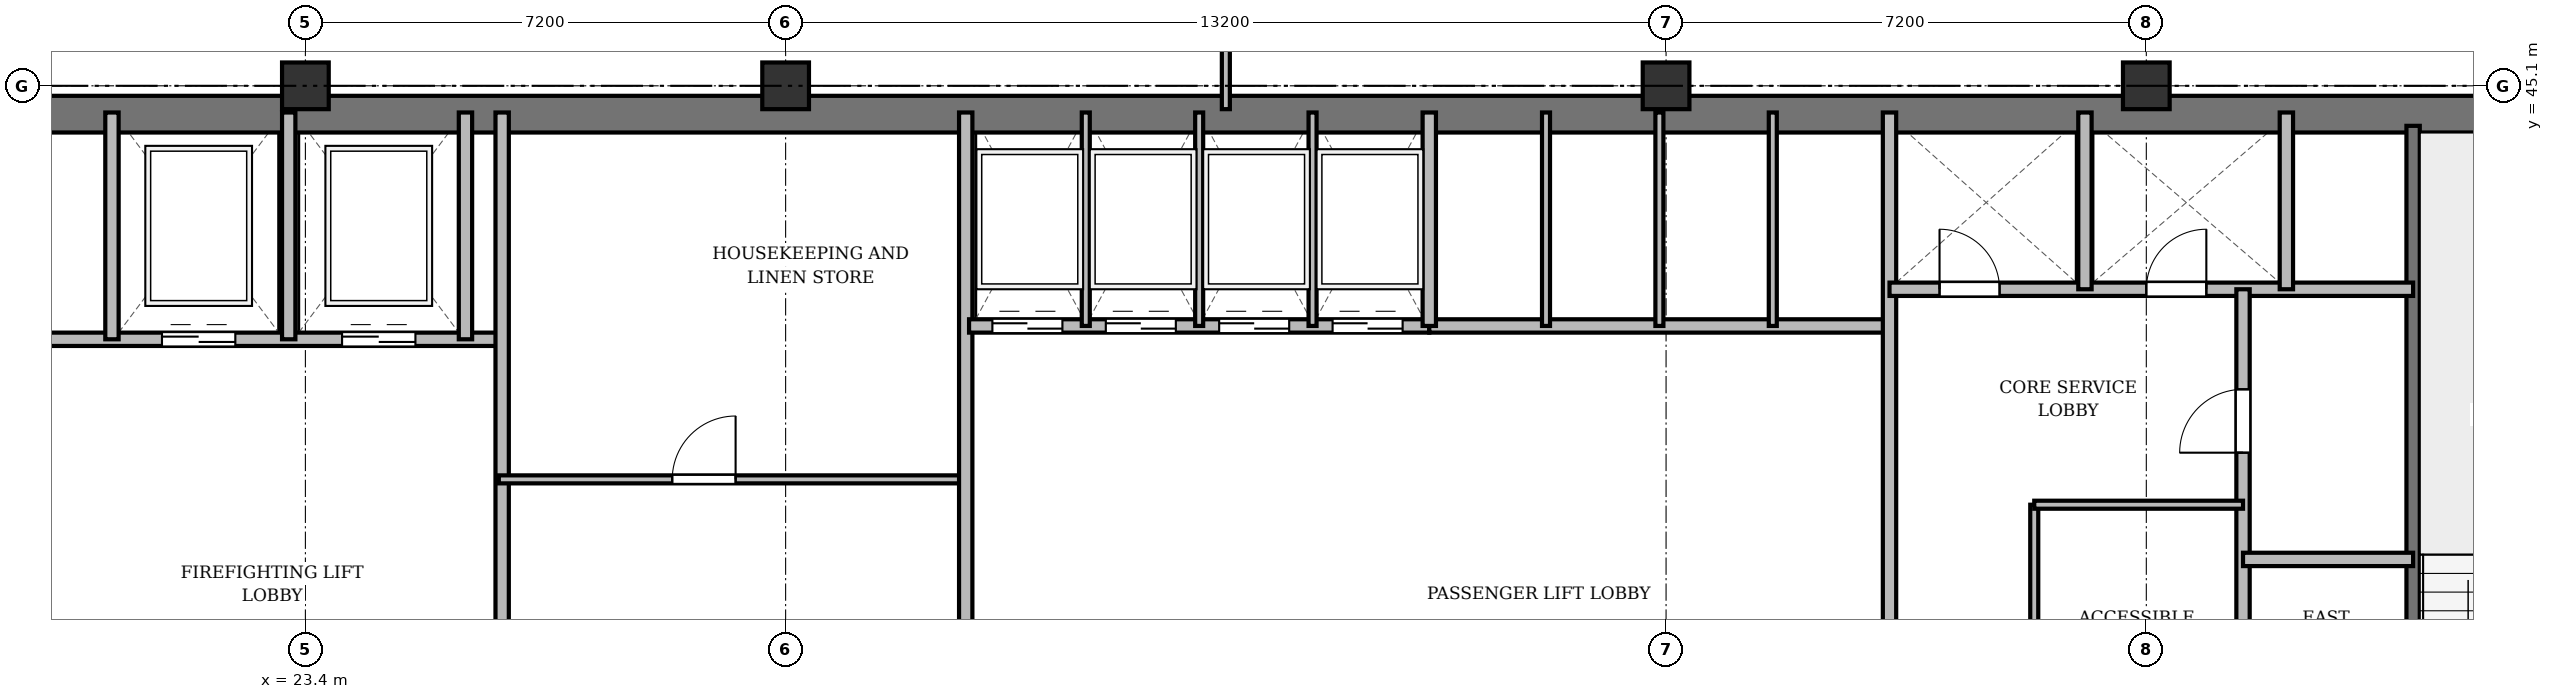
"""IFC4 building model, lengths in metres.
Left out: names, types, materials, properties, quantities, classifications, styles, units other than length and angle.
Written with IfcOpenShell. Run it as: python <this file> out.ifc"""

import sys

from ifc_helpers import new_model, si_unit, direction, frame, frame_2d, origin, origin_2d, place, context, subcontext, project, spatial, rectangle, extrude, source, transform, mapped, element, fill, save


model = new_model("IFC4")
c1 = context("Model", 3, precision=1e-05, world=origin(), true_north=direction((0.0, 1.0)))
c2 = subcontext(c1, "Body", "Model", "MODEL_VIEW")
j1 = project(units=[si_unit("LENGTHUNIT", "METRE"), si_unit("PLANEANGLEUNIT", "RADIAN")], contexts=[c1])
p1 = place(None, origin())
s1 = spatial("IfcSite", under=j1, at=p1, CompositionType="ELEMENT")
p2 = place(p1, origin())
s2 = spatial("IfcBuilding", under=s1, at=p2, CompositionType="ELEMENT")
p3 = place(p2, frame((0.0, 0.0, 212.1)))
s3 = spatial("IfcBuildingStorey", under=s2, at=p3, CompositionType="ELEMENT", Elevation=212.1)
m1 = source(origin(), c2, "Body", "SweptSolid", [
    extrude(rectangle(XDim=0.7, YDim=0.7, at=origin_2d()), origin(), (0.0, 0.0, 1.0), 3.6),
])
for number, where, z_axis, x_axis in (
    (1, (23.4, 45.1, 0.0), (0.0, 0.0, 1.0), (1.0, 0.0, 0.0)),
    (2, (30.6, 45.1, 0.0), (0.0, 0.0, 1.0), (1.0, 0.0, 0.0)),
    (3, (43.8, 45.1, 0.0), (0.0, 0.0, 1.0), (1.0, 0.0, 0.0)),
    (4, (51.0, 45.1, 0.0), (0.0, 0.0, 1.0), (1.0, 0.0, 0.0)),
):
    element("IfcColumn", number, at=place(p3, frame(where, z_axis=z_axis, x_axis=x_axis)), inside=s3, PredefinedType="COLUMN", context=c2, shape_type="MappedRepresentation", body=[
        mapped(m1, transform((0.0, 0.0, 0.0), x_axis=(1.0, 0.0, 0.0), y_axis=(0.0, 1.0, 0.0), z_axis=(0.0, 0.0, 1.0), scale=1.0)),
    ])
p4 = place(p3, frame((15.65, 44.675, 0.0), z_axis=(0.0, 0.0, 1.0), x_axis=(1.0, 0.0, 0.0)))
e5 = element("IfcWall", 5, at=p4, inside=s3, PredefinedType="SHEAR", context=c2, shape_type="SweptSolid", body=[
    extrude(rectangle(XDim=43.1, YDim=0.55, at=frame_2d((21.55, 0.0))), origin(), (0.0, 0.0, 1.0), 3.36),
])
p5 = place(p3, frame((55.0, 33.4, 0.0), z_axis=(0.0, 0.0, 1.0), x_axis=(0.0, 1.0, 0.0)))
e6 = element("IfcWall", 6, at=p5, inside=s3, PredefinedType="SHEAR", context=c2, shape_type="SweptSolid", body=[
    extrude(rectangle(XDim=11.1, YDim=0.2, at=frame_2d((5.55, 0.0))), origin(), (0.0, 0.0, 1.0), 3.36),
])
p6 = place(p5, frame((0.85, 0.0, 0.0)))
e7 = element("IfcOpeningElement", 7, at=p6, cuts=e6, PredefinedType="OPENING", context=c2, shape_type="SweptSolid", body=[
    extrude(rectangle(XDim=1.1, YDim=2.15, at=frame_2d((0.55, 1.075))), frame((0.0, 0.11, 0.0), z_axis=(0.0, -1.0, 0.0), x_axis=(1.0, 0.0, 0.0)), (0.0, 0.0, 1.0), 0.22),
])
p7 = place(p3, frame((19.55, 41.3, 0.0), z_axis=(0.0, 0.0, 1.0), x_axis=(1.0, 0.0, 0.0)))
e8 = element("IfcWall", 8, at=p7, inside=s3, PredefinedType="SOLIDWALL", context=c2, shape_type="SweptSolid", body=[
    extrude(rectangle(XDim=6.75, YDim=0.2, at=frame_2d((3.375, 0.0))), origin(), (0.0, 0.0, 1.0), 3.36),
])
p8 = place(p7, frame((1.7, 0.0, 0.0)))
e9 = element("IfcOpeningElement", 9, at=p8, cuts=e8, PredefinedType="OPENING", context=c2, shape_type="SweptSolid", body=[
    extrude(rectangle(XDim=1.1, YDim=2.15, at=frame_2d((0.55, 1.075))), frame((0.0, 0.11, 0.0), z_axis=(0.0, -1.0, 0.0), x_axis=(1.0, 0.0, 0.0)), (0.0, 0.0, 1.0), 0.22),
])
p9 = place(p7, frame((4.4, 0.0, 0.0)))
e10 = element("IfcOpeningElement", 10, at=p9, cuts=e8, PredefinedType="OPENING", context=c2, shape_type="SweptSolid", body=[
    extrude(rectangle(XDim=1.1, YDim=2.15, at=frame_2d((0.55, 1.075))), frame((0.0, 0.11, 0.0), z_axis=(0.0, -1.0, 0.0), x_axis=(1.0, 0.0, 0.0)), (0.0, 0.0, 1.0), 0.22),
])
for number, where, z_axis, x_axis in (
    (11, (20.5, 41.3, 0.0), (0.0, 0.0, 1.0), (0.0, 1.0, 0.0)),
    (12, (23.15, 41.3, 0.0), (0.0, 0.0, 1.0), (0.0, 1.0, 0.0)),
    (13, (25.8, 41.3, 0.0), (0.0, 0.0, 1.0), (0.0, 1.0, 0.0)),
):
    element("IfcWall", number, at=place(p3, frame(where, z_axis=z_axis, x_axis=x_axis)), inside=s3, PredefinedType="SOLIDWALL", context=c2, shape_type="SweptSolid", body=[
        extrude(rectangle(XDim=3.4, YDim=0.2, at=frame_2d((1.7, 0.0))), origin(), (0.0, 0.0, 1.0), 3.36),
    ])
p10 = place(p3, frame((26.35, 33.4, 0.0), z_axis=(0.0, 0.0, 1.0), x_axis=(0.0, 1.0, 0.0)))
e14 = element("IfcWall", 14, at=p10, inside=s3, PredefinedType="SOLIDWALL", context=c2, shape_type="SweptSolid", body=[
    extrude(rectangle(XDim=11.3, YDim=0.2, at=frame_2d((5.65, 0.0))), origin(), (0.0, 0.0, 1.0), 2.91),
])
p11 = place(p3, frame((26.3, 39.2, 0.0), z_axis=(0.0, 0.0, 1.0), x_axis=(1.0, 0.0, 0.0)))
e15 = element("IfcWall", 15, at=p11, inside=s3, PredefinedType="PARTITIONING", context=c2, shape_type="SweptSolid", body=[
    extrude(rectangle(XDim=7.0, YDim=0.12, at=frame_2d((3.5, 0.0))), origin(), (0.0, 0.0, 1.0), 2.86),
])
p12 = place(p11, frame((2.6, 0.0, 0.0)))
e16 = element("IfcOpeningElement", 16, at=p12, cuts=e15, PredefinedType="OPENING", context=c2, shape_type="SweptSolid", body=[
    extrude(rectangle(XDim=0.95, YDim=2.15, at=frame_2d((0.475, 1.075))), frame((0.0, 0.07, 0.0), z_axis=(0.0, -1.0, 0.0), x_axis=(1.0, 0.0, 0.0)), (0.0, 0.0, 1.0), 0.14),
])
p13 = place(p3, frame((33.3, 33.4, 0.0), z_axis=(0.0, 0.0, 1.0), x_axis=(0.0, 1.0, 0.0)))
e17 = element("IfcWall", 17, at=p13, inside=s3, PredefinedType="SOLIDWALL", context=c2, shape_type="SweptSolid", body=[
    extrude(rectangle(XDim=11.3, YDim=0.2, at=frame_2d((5.65, 0.0))), origin(), (0.0, 0.0, 1.0), 2.91),
])
p14 = place(p3, frame((33.35, 41.5, 0.0), z_axis=(0.0, 0.0, 1.0), x_axis=(1.0, 0.0, 0.0)))
e18 = element("IfcWall", 18, at=p14, inside=s3, PredefinedType="SOLIDWALL", context=c2, shape_type="SweptSolid", body=[
    extrude(rectangle(XDim=6.9, YDim=0.2, at=frame_2d((3.45, 0.0))), origin(), (0.0, 0.0, 1.0), 3.36),
])
p15 = place(p14, frame((0.35, 0.0, 0.0)))
e19 = element("IfcOpeningElement", 19, at=p15, cuts=e18, PredefinedType="OPENING", context=c2, shape_type="SweptSolid", body=[
    extrude(rectangle(XDim=1.05, YDim=2.15, at=frame_2d((0.525, 1.075))), frame((0.0, 0.11, 0.0), z_axis=(0.0, -1.0, 0.0), x_axis=(1.0, 0.0, 0.0)), (0.0, 0.0, 1.0), 0.22),
])
p16 = place(p14, frame((2.05, 0.0, 0.0)))
e20 = element("IfcOpeningElement", 20, at=p16, cuts=e18, PredefinedType="OPENING", context=c2, shape_type="SweptSolid", body=[
    extrude(rectangle(XDim=1.05, YDim=2.15, at=frame_2d((0.525, 1.075))), frame((0.0, 0.11, 0.0), z_axis=(0.0, -1.0, 0.0), x_axis=(1.0, 0.0, 0.0)), (0.0, 0.0, 1.0), 0.22),
])
p17 = place(p14, frame((3.75, 0.0, 0.0)))
e21 = element("IfcOpeningElement", 21, at=p17, cuts=e18, PredefinedType="OPENING", context=c2, shape_type="SweptSolid", body=[
    extrude(rectangle(XDim=1.05, YDim=2.15, at=frame_2d((0.525, 1.075))), frame((0.0, 0.11, 0.0), z_axis=(0.0, -1.0, 0.0), x_axis=(1.0, 0.0, 0.0)), (0.0, 0.0, 1.0), 0.22),
])
p18 = place(p14, frame((5.45, 0.0, 0.0)))
e22 = element("IfcOpeningElement", 22, at=p18, cuts=e18, PredefinedType="OPENING", context=c2, shape_type="SweptSolid", body=[
    extrude(rectangle(XDim=1.05, YDim=2.15, at=frame_2d((0.525, 1.075))), frame((0.0, 0.11, 0.0), z_axis=(0.0, -1.0, 0.0), x_axis=(1.0, 0.0, 0.0)), (0.0, 0.0, 1.0), 0.22),
])
for number, where, z_axis, x_axis in (
    (23, (35.1, 41.5, 0.0), (0.0, 0.0, 1.0), (0.0, 1.0, 0.0)),
    (24, (36.8, 41.5, 0.0), (0.0, 0.0, 1.0), (0.0, 1.0, 0.0)),
    (25, (38.5, 41.5, 0.0), (0.0, 0.0, 1.0), (0.0, 1.0, 0.0)),
):
    element("IfcWall", number, at=place(p3, frame(where, z_axis=z_axis, x_axis=x_axis)), inside=s3, PredefinedType="PARTITIONING", context=c2, shape_type="SweptSolid", body=[
        extrude(rectangle(XDim=3.2, YDim=0.12, at=frame_2d((1.6, 0.0))), origin(), (0.0, 0.0, 1.0), 3.36),
    ])
p19 = place(p3, frame((40.25, 41.5, 0.0), z_axis=(0.0, 0.0, 1.0), x_axis=(1.0, 0.0, 0.0)))
e26 = element("IfcWall", 26, at=p19, inside=s3, PredefinedType="SOLIDWALL", context=c2, shape_type="SweptSolid", body=[
    extrude(rectangle(XDim=6.9, YDim=0.2, at=frame_2d((3.45, 0.0))), origin(), (0.0, 0.0, 1.0), 3.36),
])
p20 = place(p3, frame((40.25, 41.5, 0.0), z_axis=(0.0, 0.0, 1.0), x_axis=(0.0, 1.0, 0.0)))
e27 = element("IfcWall", 27, at=p20, inside=s3, PredefinedType="SOLIDWALL", context=c2, shape_type="SweptSolid", body=[
    extrude(rectangle(XDim=3.2, YDim=0.2, at=frame_2d((1.6, 0.0))), origin(), (0.0, 0.0, 1.0), 3.36),
])
for number, where, z_axis, x_axis in (
    (28, (42.0, 41.5, 0.0), (0.0, 0.0, 1.0), (0.0, 1.0, 0.0)),
    (29, (43.7, 41.5, 0.0), (0.0, 0.0, 1.0), (0.0, 1.0, 0.0)),
    (30, (45.4, 41.5, 0.0), (0.0, 0.0, 1.0), (0.0, 1.0, 0.0)),
):
    element("IfcWall", number, at=place(p3, frame(where, z_axis=z_axis, x_axis=x_axis)), inside=s3, PredefinedType="PARTITIONING", context=c2, shape_type="SweptSolid", body=[
        extrude(rectangle(XDim=3.2, YDim=0.12, at=frame_2d((1.6, 0.0))), origin(), (0.0, 0.0, 1.0), 3.36),
    ])
p21 = place(p3, frame((47.15, 33.4, 0.0), z_axis=(0.0, 0.0, 1.0), x_axis=(0.0, 1.0, 0.0)))
e31 = element("IfcWall", 31, at=p21, inside=s3, PredefinedType="SOLIDWALL", context=c2, shape_type="SweptSolid", body=[
    extrude(rectangle(XDim=11.3, YDim=0.2, at=frame_2d((5.65, 0.0))), origin(), (0.0, 0.0, 1.0), 2.91),
])
p22 = place(p3, frame((47.15, 42.05, 0.0), z_axis=(0.0, 0.0, 1.0), x_axis=(1.0, 0.0, 0.0)))
e32 = element("IfcWall", 32, at=p22, inside=s3, PredefinedType="SOLIDWALL", context=c2, shape_type="SweptSolid", body=[
    extrude(rectangle(XDim=7.85, YDim=0.2, at=frame_2d((3.925, 0.0))), origin(), (0.0, 0.0, 1.0), 2.86),
])
p23 = place(p22, frame((0.75, 0.0, 0.0)))
e33 = element("IfcOpeningElement", 33, at=p23, cuts=e32, PredefinedType="OPENING", context=c2, shape_type="SweptSolid", body=[
    extrude(rectangle(XDim=0.9, YDim=2.1, at=frame_2d((0.45, 1.05))), frame((0.0, 0.11, 0.0), z_axis=(0.0, -1.0, 0.0), x_axis=(1.0, 0.0, 0.0)), (0.0, 0.0, 1.0), 0.22),
])
p24 = place(p22, frame((3.85, 0.0, 0.0)))
e34 = element("IfcOpeningElement", 34, at=p24, cuts=e32, PredefinedType="OPENING", context=c2, shape_type="SweptSolid", body=[
    extrude(rectangle(XDim=0.9, YDim=2.1, at=frame_2d((0.45, 1.05))), frame((0.0, 0.11, 0.0), z_axis=(0.0, -1.0, 0.0), x_axis=(1.0, 0.0, 0.0)), (0.0, 0.0, 1.0), 0.22),
])
for number, where, z_axis, x_axis in (
    (35, (50.08, 42.05, 0.0), (0.0, 0.0, 1.0), (0.0, 1.0, 0.0)),
    (36, (53.1, 42.05, 0.0), (0.0, 0.0, 1.0), (0.0, 1.0, 0.0)),
):
    element("IfcWall", number, at=place(p3, frame(where, z_axis=z_axis, x_axis=x_axis)), inside=s3, PredefinedType="SOLIDWALL", context=c2, shape_type="SweptSolid", body=[
        extrude(rectangle(XDim=2.65, YDim=0.2, at=frame_2d((1.325, 0.0))), origin(), (0.0, 0.0, 1.0), 3.36),
    ])
p25 = place(p3, frame((52.45, 33.4, 0.0), z_axis=(0.0, 0.0, 1.0), x_axis=(0.0, 1.0, 0.0)))
e37 = element("IfcWall", 37, at=p25, inside=s3, PredefinedType="PARTITIONING", context=c2, shape_type="SweptSolid", body=[
    extrude(rectangle(XDim=8.65, YDim=0.2, at=frame_2d((4.325, 0.0))), origin(), (0.0, 0.0, 1.0), 2.91),
])
p26 = place(p25, frame((6.2, 0.0, 0.0)))
e38 = element("IfcOpeningElement", 38, at=p26, cuts=e37, PredefinedType="OPENING", context=c2, shape_type="SweptSolid", body=[
    extrude(rectangle(XDim=0.95, YDim=2.15, at=frame_2d((0.475, 1.075))), frame((0.0, 0.11, 0.0), z_axis=(0.0, -1.0, 0.0), x_axis=(1.0, 0.0, 0.0)), (0.0, 0.0, 1.0), 0.22),
])
p27 = place(p3, frame((52.45, 38.0, 0.0), z_axis=(0.0, 0.0, 1.0), x_axis=(1.0, 0.0, 0.0)))
e39 = element("IfcWall", 39, at=p27, inside=s3, PredefinedType="PARTITIONING", context=c2, shape_type="SweptSolid", body=[
    extrude(rectangle(XDim=2.55, YDim=0.2, at=frame_2d((1.275, 0.0))), origin(), (0.0, 0.0, 1.0), 3.36),
])
p28 = place(p3, frame((49.32, 33.4, 0.0), z_axis=(0.0, 0.0, 1.0), x_axis=(0.0, 1.0, 0.0)))
e40 = element("IfcWall", 40, at=p28, inside=s3, PredefinedType="PARTITIONING", context=c2, shape_type="SweptSolid", body=[
    extrude(rectangle(XDim=5.42, YDim=0.12, at=frame_2d((2.71, 0.0))), origin(), (0.0, 0.0, 1.0), 2.91),
])
p29 = place(p28, frame((1.6, 0.0, 0.0)))
e41 = element("IfcOpeningElement", 41, at=p29, cuts=e40, PredefinedType="OPENING", context=c2, shape_type="SweptSolid", body=[
    extrude(rectangle(XDim=0.95, YDim=2.15, at=frame_2d((0.475, 1.075))), frame((0.0, 0.07, 0.0), z_axis=(0.0, -1.0, 0.0), x_axis=(1.0, 0.0, 0.0)), (0.0, 0.0, 1.0), 0.14),
])
p30 = place(p3, frame((49.32, 38.82, 0.0), z_axis=(0.0, 0.0, 1.0), x_axis=(1.0, 0.0, 0.0)))
e42 = element("IfcWall", 42, at=p30, inside=s3, PredefinedType="PARTITIONING", context=c2, shape_type="SweptSolid", body=[
    extrude(rectangle(XDim=3.13, YDim=0.12, at=frame_2d((1.565, 0.0))), origin(), (0.0, 0.0, 1.0), 2.86),
])
p31 = place(p3, frame((37.2, 44.75, 0.0), z_axis=(0.0, 0.0, 1.0), x_axis=(0.0, 1.0, 0.0)))
e43 = element("IfcWall", 43, at=p31, inside=s3, PredefinedType="PARTITIONING", context=c2, shape_type="SweptSolid", body=[
    extrude(rectangle(XDim=3.61, YDim=0.12, at=frame_2d((1.805, 0.0))), origin(), (0.0, 0.0, 1.0), 2.91),
])
p32 = place(p31, frame((1.1, 0.0, 0.0)))
e44 = element("IfcOpeningElement", 44, at=p32, cuts=e43, PredefinedType="OPENING", context=c2, shape_type="SweptSolid", body=[
    extrude(rectangle(XDim=0.95, YDim=2.15, at=frame_2d((0.475, 1.075))), frame((0.0, 0.07, 0.0), z_axis=(0.0, -1.0, 0.0), x_axis=(1.0, 0.0, 0.0)), (0.0, 0.0, 1.0), 0.14),
])
m2 = source(origin(), c2, "Body", "SweptSolid", [
    extrude(rectangle(XDim=1.1, YDim=2.15, at=frame_2d((0.55, 1.075))), frame((0.0, 0.025, 0.0), z_axis=(0.0, -1.0, 0.0), x_axis=(1.0, 0.0, 0.0)), (0.0, 0.0, 1.0), 0.05),
])
p33 = place(p8, origin())
e45 = element("IfcDoor", 45, at=p33, inside=s3, OperationType="DOUBLE_DOOR_SLIDING", PredefinedType="DOOR", context=c2, shape_type="MappedRepresentation", body=[
    mapped(m2, transform((0.0, 0.0, 0.0), x_axis=(1.0, 0.0, 0.0), y_axis=(0.0, 1.0, 0.0), z_axis=(0.0, 0.0, 1.0), scale=1.0)),
])
fill(e9, e45)
p34 = place(p9, origin())
e46 = element("IfcDoor", 46, at=p34, inside=s3, OperationType="DOUBLE_DOOR_SLIDING", PredefinedType="DOOR", context=c2, shape_type="MappedRepresentation", body=[
    mapped(m2, transform((0.0, 0.0, 0.0), x_axis=(1.0, 0.0, 0.0), y_axis=(0.0, 1.0, 0.0), z_axis=(0.0, 0.0, 1.0), scale=1.0)),
])
fill(e10, e46)
m3 = source(origin(), c2, "Body", "SweptSolid", [
    extrude(rectangle(XDim=0.95, YDim=2.15, at=frame_2d((0.475, 1.075))), frame((0.0, 0.025, 0.0), z_axis=(0.0, -1.0, 0.0), x_axis=(1.0, 0.0, 0.0)), (0.0, 0.0, 1.0), 0.05),
])
p35 = place(p12, origin())
e47 = element("IfcDoor", 47, at=p35, inside=s3, OperationType="SINGLE_SWING_RIGHT", PredefinedType="DOOR", context=c2, shape_type="MappedRepresentation", body=[
    mapped(m3, transform((0.0, 0.0, 0.0), x_axis=(1.0, 0.0, 0.0), y_axis=(0.0, 1.0, 0.0), z_axis=(0.0, 0.0, 1.0), scale=1.0)),
])
fill(e16, e47)
m4 = source(origin(), c2, "Body", "SweptSolid", [
    extrude(rectangle(XDim=1.05, YDim=2.15, at=frame_2d((0.525, 1.075))), frame((0.0, 0.025, 0.0), z_axis=(0.0, -1.0, 0.0), x_axis=(1.0, 0.0, 0.0)), (0.0, 0.0, 1.0), 0.05),
])
p36 = place(p15, origin())
e48 = element("IfcDoor", 48, at=p36, inside=s3, OperationType="DOUBLE_DOOR_SLIDING", PredefinedType="DOOR", context=c2, shape_type="MappedRepresentation", body=[
    mapped(m4, transform((0.0, 0.0, 0.0), x_axis=(1.0, 0.0, 0.0), y_axis=(0.0, 1.0, 0.0), z_axis=(0.0, 0.0, 1.0), scale=1.0)),
])
fill(e19, e48)
p37 = place(p16, origin())
e49 = element("IfcDoor", 49, at=p37, inside=s3, OperationType="DOUBLE_DOOR_SLIDING", PredefinedType="DOOR", context=c2, shape_type="MappedRepresentation", body=[
    mapped(m4, transform((0.0, 0.0, 0.0), x_axis=(1.0, 0.0, 0.0), y_axis=(0.0, 1.0, 0.0), z_axis=(0.0, 0.0, 1.0), scale=1.0)),
])
fill(e20, e49)
p38 = place(p17, origin())
e50 = element("IfcDoor", 50, at=p38, inside=s3, OperationType="DOUBLE_DOOR_SLIDING", PredefinedType="DOOR", context=c2, shape_type="MappedRepresentation", body=[
    mapped(m4, transform((0.0, 0.0, 0.0), x_axis=(1.0, 0.0, 0.0), y_axis=(0.0, 1.0, 0.0), z_axis=(0.0, 0.0, 1.0), scale=1.0)),
])
fill(e21, e50)
p39 = place(p18, origin())
e51 = element("IfcDoor", 51, at=p39, inside=s3, OperationType="DOUBLE_DOOR_SLIDING", PredefinedType="DOOR", context=c2, shape_type="MappedRepresentation", body=[
    mapped(m4, transform((0.0, 0.0, 0.0), x_axis=(1.0, 0.0, 0.0), y_axis=(0.0, 1.0, 0.0), z_axis=(0.0, 0.0, 1.0), scale=1.0)),
])
fill(e22, e51)
m5 = source(origin(), c2, "Body", "SweptSolid", [
    extrude(rectangle(XDim=0.9, YDim=2.1, at=frame_2d((0.45, 1.05))), frame((0.0, 0.025, 0.0), z_axis=(0.0, -1.0, 0.0), x_axis=(1.0, 0.0, 0.0)), (0.0, 0.0, 1.0), 0.05),
])
p40 = place(p23, origin())
e52 = element("IfcDoor", 52, at=p40, inside=s3, OperationType="SINGLE_SWING_LEFT", PredefinedType="DOOR", context=c2, shape_type="MappedRepresentation", body=[
    mapped(m5, transform((0.0, 0.0, 0.0), x_axis=(1.0, 0.0, 0.0), y_axis=(0.0, 1.0, 0.0), z_axis=(0.0, 0.0, 1.0), scale=1.0)),
])
fill(e33, e52)
p41 = place(p24, origin())
e53 = element("IfcDoor", 53, at=p41, inside=s3, OperationType="SINGLE_SWING_RIGHT", PredefinedType="DOOR", context=c2, shape_type="MappedRepresentation", body=[
    mapped(m5, transform((0.0, 0.0, 0.0), x_axis=(1.0, 0.0, 0.0), y_axis=(0.0, 1.0, 0.0), z_axis=(0.0, 0.0, 1.0), scale=1.0)),
])
fill(e34, e53)
p42 = place(p26, origin())
e54 = element("IfcDoor", 54, at=p42, inside=s3, OperationType="SINGLE_SWING_LEFT", PredefinedType="DOOR", context=c2, shape_type="MappedRepresentation", body=[
    mapped(m3, transform((0.0, 0.0, 0.0), x_axis=(1.0, 0.0, 0.0), y_axis=(0.0, 1.0, 0.0), z_axis=(0.0, 0.0, 1.0), scale=1.0)),
])
fill(e38, e54)
save(model, sys.argv[1])
